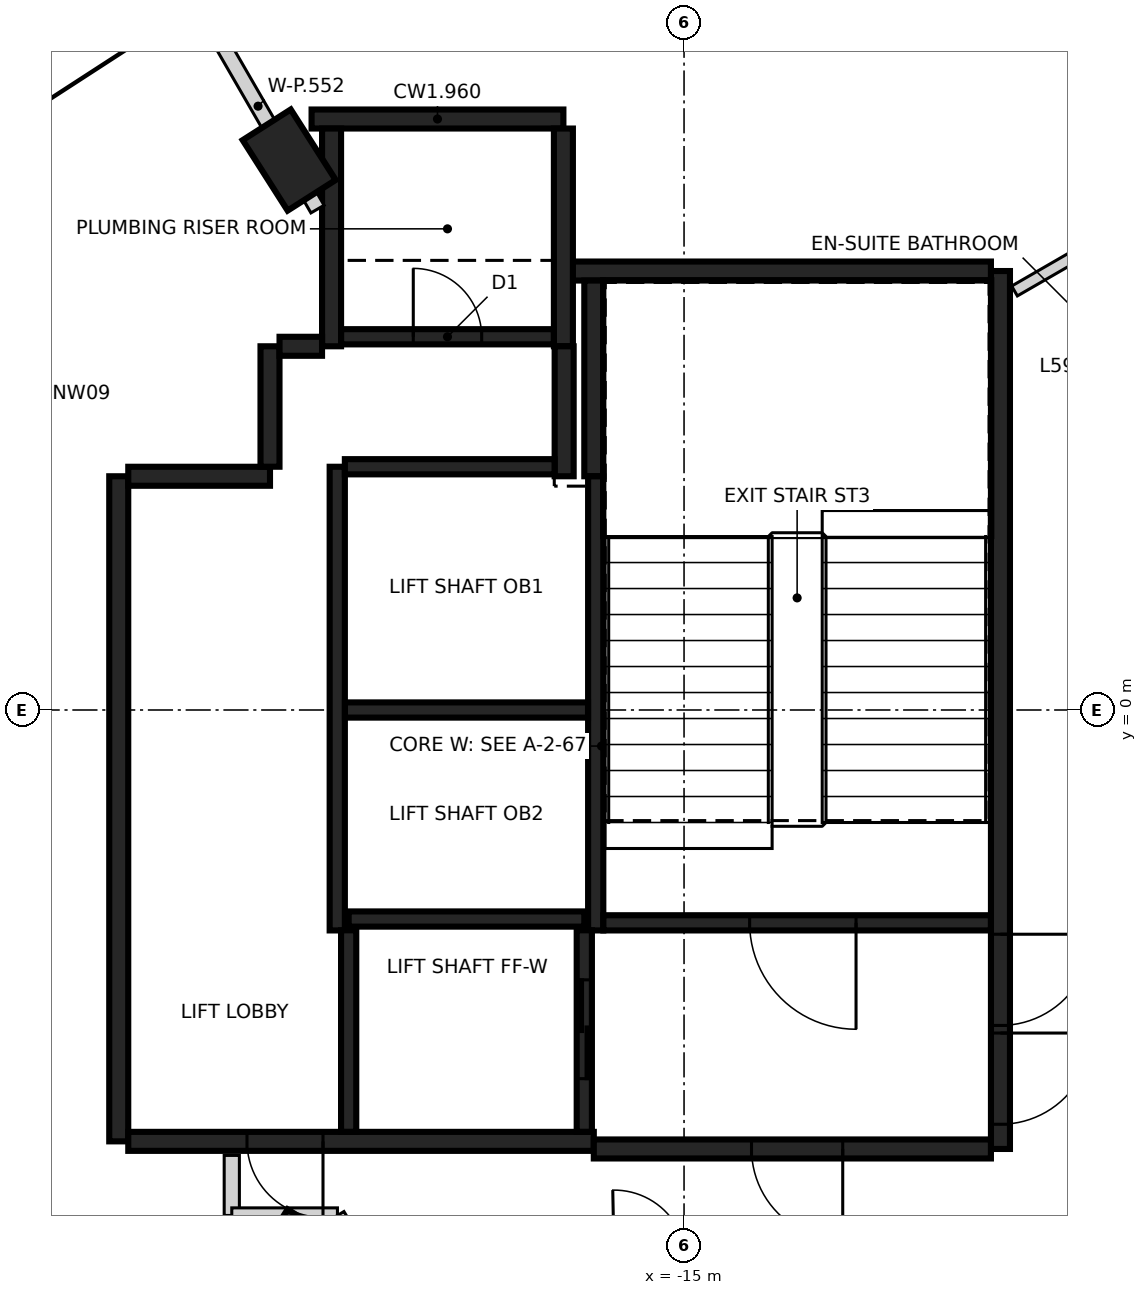
"""IFC4 building model, lengths in metres.
Left out: names, types, materials, properties, quantities, classifications, styles, units other than length and angle.
Written with IfcOpenShell. Run it as: python <this file> out.ifc"""

import sys

from ifc_helpers import new_model, si_unit, direction, frame, frame_2d, origin, origin_2d, place, context, subcontext, project, spatial, rectangle, extrude, element, fill, save


model = new_model("IFC4")
c1 = context("Model", 3, precision=1e-05, world=origin(), true_north=direction((0.0, 1.0)))
c2 = subcontext(c1, "Body", "Model", "MODEL_VIEW")
j1 = project(units=[si_unit("LENGTHUNIT", "METRE"), si_unit("PLANEANGLEUNIT", "RADIAN")], contexts=[c1])
p1 = place(None, origin())
s1 = spatial("IfcSite", under=j1, at=p1, CompositionType="ELEMENT")
p2 = place(p1, origin())
s2 = spatial("IfcBuilding", under=s1, at=p2, CompositionType="ELEMENT")
p3 = place(p2, frame((0.0, 0.0, 235.8)))
s3 = spatial("IfcBuildingStorey", under=s2, at=p3, CompositionType="ELEMENT", Elevation=235.8)
for number, where, z_axis, x_axis in (
    (1, (-20.195, 7.235, -0.35), (0.0, 0.0, 1.0), (-0.538, 0.843, 0.0)),
    (2, (-20.195, -7.235, -0.35), (0.0, 0.0, 1.0), (0.538, 0.843, 0.0)),
):
    element("IfcColumn", number, at=place(p3, frame(where, z_axis=z_axis, x_axis=x_axis)), inside=s3, PredefinedType="COLUMN", context=c2, shape_type="SweptSolid", body=[
        extrude(rectangle(XDim=1.1, YDim=0.75, at=origin_2d()), origin(), (0.0, 0.0, 1.0), 3.6),
    ])
p4 = place(p3, frame((-10.837, 5.775, 0.0), z_axis=(0.0, 0.0, 1.0), x_axis=(0.0, -1.0, 0.0)))
e3 = element("IfcWall", 3, at=p4, inside=s3, PredefinedType="SHEAR", context=c2, shape_type="SweptSolid", body=[
    extrude(rectangle(XDim=11.55, YDim=0.25, at=frame_2d((5.775, 0.0))), origin(), (0.0, 0.0, 1.0), 3.25),
])
p5 = place(p4, frame((10.025, 0.0, 0.0)))
e4 = element("IfcOpeningElement", 4, at=p5, cuts=e3, PredefinedType="OPENING", context=c2, shape_type="SweptSolid", body=[
    extrude(rectangle(XDim=1.2, YDim=2.1, at=frame_2d((0.6, 1.05))), frame((0.0, 0.135, 0.0), z_axis=(0.0, -1.0, 0.0), x_axis=(1.0, 0.0, 0.0)), (0.0, 0.0, 1.0), 0.27),
])
p6 = place(p4, frame((8.725, 0.0, 0.0)))
e5 = element("IfcOpeningElement", 5, at=p6, cuts=e3, PredefinedType="OPENING", context=c2, shape_type="SweptSolid", body=[
    extrude(rectangle(XDim=1.2, YDim=2.1, at=frame_2d((0.6, 1.05))), frame((0.0, 0.135, 0.0), z_axis=(0.0, -1.0, 0.0), x_axis=(1.0, 0.0, 0.0)), (0.0, 0.0, 1.0), 0.27),
])
p7 = place(p3, frame((-22.437, -5.675, 0.0), z_axis=(0.0, 0.0, 1.0), x_axis=(0.0, 1.0, 0.0)))
e6 = element("IfcWall", 6, at=p7, inside=s3, PredefinedType="SHEAR", context=c2, shape_type="SweptSolid", body=[
    extrude(rectangle(XDim=8.75, YDim=0.25, at=frame_2d((4.375, 0.0))), origin(), (0.0, 0.0, 1.0), 3.25),
])
p8 = place(p3, frame((-16.187, -5.675, 0.0), z_axis=(0.0, 0.0, 1.0), x_axis=(-1.0, 0.0, 0.0)))
e7 = element("IfcWall", 7, at=p8, inside=s3, PredefinedType="SHEAR", context=c2, shape_type="SweptSolid", body=[
    extrude(rectangle(XDim=6.125, YDim=0.25, at=frame_2d((3.062, 0.0))), origin(), (0.0, 0.0, 1.0), 3.25),
])
p9 = place(p8, frame((3.563, 0.0, 0.0)))
e8 = element("IfcOpeningElement", 8, at=p9, cuts=e7, PredefinedType="OPENING", context=c2, shape_type="SweptSolid", body=[
    extrude(rectangle(XDim=1.0, YDim=2.1, at=frame_2d((0.5, 1.05))), frame((0.0, 0.135, 0.0), z_axis=(0.0, -1.0, 0.0), x_axis=(1.0, 0.0, 0.0)), (0.0, 0.0, 1.0), 0.27),
])
p10 = place(p3, frame((-10.963, -5.775, 0.0), z_axis=(0.0, 0.0, 1.0), x_axis=(-1.0, 0.0, 0.0)))
e9 = element("IfcWall", 9, at=p10, inside=s3, PredefinedType="SHEAR", context=c2, shape_type="SweptSolid", body=[
    extrude(rectangle(XDim=5.225, YDim=0.25, at=frame_2d((2.612, 0.0))), origin(), (0.0, 0.0, 1.0), 3.25),
])
p11 = place(p10, frame((1.95, 0.0, 0.0)))
e10 = element("IfcOpeningElement", 10, at=p11, cuts=e9, PredefinedType="OPENING", context=c2, shape_type="SweptSolid", body=[
    extrude(rectangle(XDim=1.2, YDim=2.1, at=frame_2d((0.6, 1.05))), frame((0.0, 0.135, 0.0), z_axis=(0.0, -1.0, 0.0), x_axis=(1.0, 0.0, 0.0)), (0.0, 0.0, 1.0), 0.27),
])
p12 = place(p3, frame((-16.472, 5.775, 0.0), z_axis=(0.0, 0.0, 1.0), x_axis=(1.0, 0.0, 0.0)))
e11 = element("IfcWall", 11, at=p12, inside=s3, PredefinedType="SHEAR", context=c2, shape_type="SweptSolid", body=[
    extrude(rectangle(XDim=5.51, YDim=0.25, at=frame_2d((2.755, 0.0))), origin(), (0.0, 0.0, 1.0), 3.25),
])
p13 = place(p3, frame((-19.9, 7.775, 0.0), z_axis=(0.0, 0.0, 1.0), x_axis=(1.0, 0.0, 0.0)))
e12 = element("IfcWall", 12, at=p13, inside=s3, PredefinedType="SHEAR", context=c2, shape_type="SweptSolid", body=[
    extrude(rectangle(XDim=3.313, YDim=0.25, at=frame_2d((1.656, 0.0))), origin(), (0.0, 0.0, 1.0), 3.25),
])
for number, where, z_axis, x_axis in (
    (13, (-16.587, 7.65, 0.0), (0.0, 0.0, 1.0), (0.0, -1.0, 0.0)),
    (14, (-19.637, 4.785, 0.0), (0.0, 0.0, 1.0), (0.0, 1.0, 0.0)),
):
    element("IfcWall", number, at=place(p3, frame(where, z_axis=z_axis, x_axis=x_axis)), inside=s3, PredefinedType="SHEAR", context=c2, shape_type="SweptSolid", body=[
        extrude(rectangle(XDim=2.865, YDim=0.25, at=frame_2d((1.432, 0.0))), origin(), (0.0, 0.0, 1.0), 3.25),
    ])
p14 = place(p3, frame((-16.187, 3.075, 0.0), z_axis=(0.0, 0.0, 1.0), x_axis=(0.0, 1.0, 0.0)))
e15 = element("IfcWall", 15, at=p14, inside=s3, PredefinedType="SHEAR", context=c2, shape_type="SweptSolid", body=[
    extrude(rectangle(XDim=2.575, YDim=0.25, at=frame_2d((1.287, 0.0))), origin(), (0.0, 0.0, 1.0), 3.25),
])
p15 = place(p3, frame((-22.312, 3.075, 0.0), z_axis=(0.0, 0.0, 1.0), x_axis=(1.0, 0.0, 0.0)))
e16 = element("IfcWall", 16, at=p15, inside=s3, PredefinedType="SHEAR", context=c2, shape_type="SweptSolid", body=[
    extrude(rectangle(XDim=1.865, YDim=0.25, at=frame_2d((0.932, 0.0))), origin(), (0.0, 0.0, 1.0), 3.25),
])
p16 = place(p3, frame((-16.577, 4.785, 0.0), z_axis=(0.0, 0.0, 1.0), x_axis=(0.0, -1.0, 0.0)))
e17 = element("IfcWall", 17, at=p16, inside=s3, PredefinedType="SHEAR", context=c2, shape_type="SweptSolid", body=[
    extrude(rectangle(XDim=1.71, YDim=0.25, at=frame_2d((0.855, 0.0))), origin(), (0.0, 0.0, 1.0), 3.25),
])
p17 = place(p3, frame((-20.447, 3.2, 0.0), z_axis=(0.0, 0.0, 1.0), x_axis=(0.0, 1.0, 0.0)))
e18 = element("IfcWall", 18, at=p17, inside=s3, PredefinedType="SHEAR", context=c2, shape_type="SweptSolid", body=[
    extrude(rectangle(XDim=1.584, YDim=0.25, at=frame_2d((0.792, 0.0))), origin(), (0.0, 0.0, 1.0), 3.25),
])
p18 = place(p3, frame((-20.322, 4.785, 0.0), z_axis=(0.0, 0.0, 1.0), x_axis=(1.0, 0.0, 0.0)))
e19 = element("IfcWall", 19, at=p18, inside=s3, PredefinedType="SHEAR", context=c2, shape_type="SweptSolid", body=[
    extrude(rectangle(XDim=0.559, YDim=0.25, at=frame_2d((0.28, 0.0))), origin(), (0.0, 0.0, 1.0), 3.25),
])
p19 = place(p3, frame((-16.162, 3.074, 0.0), z_axis=(0.0, 0.0, 1.0), x_axis=(0.0, -1.0, 0.0)))
e20 = element("IfcWall", 20, at=p19, inside=s3, PredefinedType="SHEAR", context=c2, shape_type="SweptSolid", body=[
    extrude(rectangle(XDim=5.974, YDim=0.2, at=frame_2d((2.987, 0.0))), origin(), (0.0, 0.0, 1.0), 3.25),
])
p20 = place(p3, frame((-19.562, -2.9, 0.0), z_axis=(0.0, 0.0, 1.0), x_axis=(0.0, 1.0, 0.0)))
e21 = element("IfcWall", 21, at=p20, inside=s3, PredefinedType="SHEAR", context=c2, shape_type="SweptSolid", body=[
    extrude(rectangle(XDim=6.1, YDim=0.2, at=frame_2d((3.05, 0.0))), origin(), (0.0, 0.0, 1.0), 3.25),
])
p21 = place(p3, frame((-10.963, -2.8, 0.0), z_axis=(0.0, 0.0, 1.0), x_axis=(-1.0, 0.0, 0.0)))
e22 = element("IfcWall", 22, at=p21, inside=s3, PredefinedType="SHEAR", context=c2, shape_type="SweptSolid", body=[
    extrude(rectangle(XDim=5.098, YDim=0.2, at=frame_2d((2.549, 0.0))), origin(), (0.0, 0.0, 1.0), 3.25),
])
p22 = place(p21, frame((1.774, 0.0, 0.0)))
e23 = element("IfcOpeningElement", 23, at=p22, cuts=e22, PredefinedType="OPENING", context=c2, shape_type="SweptSolid", body=[
    extrude(rectangle(XDim=1.4, YDim=2.1, at=frame_2d((0.7, 1.05))), frame((0.0, 0.11, 0.0), z_axis=(0.0, -1.0, 0.0), x_axis=(1.0, 0.0, 0.0)), (0.0, 0.0, 1.0), 0.22),
])
p23 = place(p3, frame((-16.263, 0.0, 0.0), z_axis=(0.0, 0.0, 1.0), x_axis=(-1.0, 0.0, 0.0)))
e24 = element("IfcWall", 24, at=p23, inside=s3, PredefinedType="SHEAR", context=c2, shape_type="SweptSolid", body=[
    extrude(rectangle(XDim=3.198, YDim=0.2, at=frame_2d((1.599, 0.0))), origin(), (0.0, 0.0, 1.0), 3.25),
])
p24 = place(p3, frame((-19.511, 4.91, 0.0), z_axis=(0.0, 0.0, 1.0), x_axis=(1.0, 0.0, 0.0)))
e25 = element("IfcWall", 25, at=p24, inside=s3, PredefinedType="SHEAR", context=c2, shape_type="SweptSolid", body=[
    extrude(rectangle(XDim=2.798, YDim=0.2, at=frame_2d((1.399, 0.0))), origin(), (0.0, 0.0, 1.0), 3.25),
])
p25 = place(p24, frame((0.949, 0.0, 0.0)))
e26 = element("IfcOpeningElement", 26, at=p25, cuts=e25, PredefinedType="OPENING", context=c2, shape_type="SweptSolid", body=[
    extrude(rectangle(XDim=0.9, YDim=2.1, at=frame_2d((0.45, 1.05))), frame((0.0, 0.11, 0.0), z_axis=(0.0, -1.0, 0.0), x_axis=(1.0, 0.0, 0.0)), (0.0, 0.0, 1.0), 0.22),
])
p26 = place(p3, frame((-19.462, 3.2, 0.0), z_axis=(0.0, 0.0, 1.0), x_axis=(1.0, 0.0, 0.0)))
e27 = element("IfcWall", 27, at=p26, inside=s3, PredefinedType="SHEAR", context=c2, shape_type="SweptSolid", body=[
    extrude(rectangle(XDim=2.759, YDim=0.2, at=frame_2d((1.379, 0.0))), origin(), (0.0, 0.0, 1.0), 3.25),
])
p27 = place(p3, frame((-19.412, -2.75, 0.0), z_axis=(0.0, 0.0, 1.0), x_axis=(1.0, 0.0, 0.0)))
e28 = element("IfcWall", 28, at=p27, inside=s3, PredefinedType="SHEAR", context=c2, shape_type="SweptSolid", body=[
    extrude(rectangle(XDim=3.1, YDim=0.2, at=frame_2d((1.55, 0.0))), origin(), (0.0, 0.0, 1.0), 3.25),
])
p28 = place(p3, frame((-16.312, -2.898, 0.0), z_axis=(0.0, 0.0, 1.0), x_axis=(0.0, -1.0, 0.0)))
e29 = element("IfcWall", 29, at=p28, inside=s3, PredefinedType="SHEAR", context=c2, shape_type="SweptSolid", body=[
    extrude(rectangle(XDim=2.651, YDim=0.2, at=frame_2d((1.325, 0.0))), origin(), (0.0, 0.0, 1.0), 3.25),
])
p29 = place(p28, frame((0.652, 0.0, 0.0)))
e30 = element("IfcOpeningElement", 30, at=p29, cuts=e29, PredefinedType="OPENING", context=c2, shape_type="SweptSolid", body=[
    extrude(rectangle(XDim=1.3, YDim=2.1, at=frame_2d((0.65, 1.05))), frame((0.0, 0.11, 0.0), z_axis=(0.0, -1.0, 0.0), x_axis=(1.0, 0.0, 0.0)), (0.0, 0.0, 1.0), 0.22),
])
p30 = place(p3, frame((-19.412, -5.549, 0.0), z_axis=(0.0, 0.0, 1.0), x_axis=(0.0, 1.0, 0.0)))
e31 = element("IfcWall", 31, at=p30, inside=s3, PredefinedType="SHEAR", context=c2, shape_type="SweptSolid", body=[
    extrude(rectangle(XDim=2.651, YDim=0.2, at=frame_2d((1.325, 0.0))), origin(), (0.0, 0.0, 1.0), 3.25),
])
p31 = place(p3, frame((-20.95, -6.65, 0.0), z_axis=(0.0, 0.0, 1.0), x_axis=(0.0, 1.0, 0.0)))
e32 = element("IfcWall", 32, at=p31, inside=s3, PredefinedType="PARTITIONING", context=c2, shape_type="SweptSolid", body=[
    extrude(rectangle(XDim=0.79, YDim=0.2, at=frame_2d((0.395, 0.0))), origin(), (0.0, 0.0, 1.0), 2.35),
])
p32 = place(p3, frame((-20.95, -6.65, 0.0), z_axis=(0.0, 0.0, 1.0), x_axis=(1.0, 0.0, 0.0)))
e33 = element("IfcWall", 33, at=p32, inside=s3, PredefinedType="PARTITIONING", context=c2, shape_type="SweptSolid", body=[
    extrude(rectangle(XDim=1.39, YDim=0.2, at=frame_2d((0.695, 0.0))), origin(), (0.0, 0.0, 1.0), 2.35),
])
p33 = place(p3, frame((-19.56, -6.65, 0.0), z_axis=(0.0, 0.0, 1.0), x_axis=(0.517618709346, -0.855611402294, 0.0)))
e34 = element("IfcWall", 34, at=p33, inside=s3, PredefinedType="PARTITIONING", context=c2, shape_type="SweptSolid", body=[
    extrude(rectangle(XDim=0.792, YDim=0.2, at=frame_2d((0.396, 0.0))), origin(), (0.0, 0.0, 1.0), 3.25),
])
p34 = place(p3, frame((-9.931, -7.149, 0.0), z_axis=(0.0, 0.0, 1.0), x_axis=(0.499934418432, 0.86606326401, 0.0)))
e35 = element("IfcWall", 35, at=p34, inside=s3, PredefinedType="PARTITIONING", context=c2, shape_type="SweptSolid", body=[
    extrude(rectangle(XDim=3.556, YDim=0.2, at=frame_2d((1.778, 0.0))), origin(), (0.0, 0.0, 1.0), 3.25),
])
p35 = place(p3, frame((-21.386, 9.298, 0.0), z_axis=(0.0, 0.0, 1.0), x_axis=(0.500017489778, -0.866015305821, 0.0)))
e36 = element("IfcWall", 36, at=p35, inside=s3, PredefinedType="PARTITIONING", context=c2, shape_type="SweptSolid", body=[
    extrude(rectangle(XDim=3.128, YDim=0.2, at=frame_2d((1.564, 0.0))), origin(), (0.0, 0.0, 1.0), 3.25),
])
p36 = place(p3, frame((-12.407, -14.806, 0.0), z_axis=(0.0, 0.0, 1.0), x_axis=(0.500104175471, 0.865965249693, 0.0)))
e37 = element("IfcWall", 37, at=p36, inside=s3, PredefinedType="PARTITIONING", context=c2, shape_type="SweptSolid", body=[
    extrude(rectangle(XDim=11.423, YDim=0.2, at=frame_2d((5.711, 0.0))), origin(), (0.0, 0.0, 1.0), 2.35),
])
p37 = place(p3, frame((-10.652, 5.512, 0.0), z_axis=(0.0, 0.0, 1.0), x_axis=(0.866017156151, 0.500014285048, 0.0)))
e38 = element("IfcWall", 38, at=p37, inside=s3, PredefinedType="PARTITIONING", context=c2, shape_type="SweptSolid", body=[
    extrude(rectangle(XDim=1.931, YDim=0.15, at=frame_2d((0.966, 0.0))), origin(), (0.0, 0.0, 1.0), 3.25),
])
p38 = place(p29, origin())
e39 = element("IfcDoor", 39, at=p38, inside=s3, OperationType="SLIDING_TO_LEFT", PredefinedType="DOOR", context=c2, shape_type="SweptSolid", body=[
    extrude(rectangle(XDim=1.3, YDim=2.1, at=frame_2d((0.65, 1.05))), frame((0.0, 0.025, 0.0), z_axis=(0.0, -1.0, 0.0), x_axis=(1.0, 0.0, 0.0)), (0.0, 0.0, 1.0), 0.05),
])
fill(e30, e39)
p39 = place(p9, origin())
e40 = element("IfcDoor", 40, at=p39, inside=s3, OperationType="SINGLE_SWING_LEFT", PredefinedType="DOOR", context=c2, shape_type="SweptSolid", body=[
    extrude(rectangle(XDim=1.0, YDim=2.1, at=frame_2d((0.5, 1.05))), frame((0.0, 0.025, 0.0), z_axis=(0.0, -1.0, 0.0), x_axis=(1.0, 0.0, 0.0)), (0.0, 0.0, 1.0), 0.05),
])
fill(e8, e40)
p40 = place(p5, origin())
e41 = element("IfcDoor", 41, at=p40, inside=s3, OperationType="SINGLE_SWING_LEFT", PredefinedType="DOOR", context=c2, shape_type="SweptSolid", body=[
    extrude(rectangle(XDim=1.2, YDim=2.1, at=frame_2d((0.6, 1.05))), frame((0.0, 0.025, 0.0), z_axis=(0.0, -1.0, 0.0), x_axis=(1.0, 0.0, 0.0)), (0.0, 0.0, 1.0), 0.05),
])
fill(e4, e41)
p41 = place(p6, origin())
e42 = element("IfcDoor", 42, at=p41, inside=s3, OperationType="SINGLE_SWING_RIGHT", PredefinedType="DOOR", context=c2, shape_type="SweptSolid", body=[
    extrude(rectangle(XDim=1.2, YDim=2.1, at=frame_2d((0.6, 1.05))), frame((0.0, 0.025, 0.0), z_axis=(0.0, -1.0, 0.0), x_axis=(1.0, 0.0, 0.0)), (0.0, 0.0, 1.0), 0.05),
])
fill(e5, e42)
p42 = place(p22, origin())
e43 = element("IfcDoor", 43, at=p42, inside=s3, OperationType="SINGLE_SWING_LEFT", PredefinedType="DOOR", context=c2, shape_type="SweptSolid", body=[
    extrude(rectangle(XDim=1.4, YDim=2.1, at=frame_2d((0.7, 1.05))), frame((0.0, 0.025, 0.0), z_axis=(0.0, -1.0, 0.0), x_axis=(1.0, 0.0, 0.0)), (0.0, 0.0, 1.0), 0.05),
])
fill(e23, e43)
p43 = place(p25, origin())
e44 = element("IfcDoor", 44, at=p43, inside=s3, OperationType="SINGLE_SWING_RIGHT", PredefinedType="DOOR", context=c2, shape_type="SweptSolid", body=[
    extrude(rectangle(XDim=0.9, YDim=2.1, at=frame_2d((0.45, 1.05))), frame((0.0, 0.025, 0.0), z_axis=(0.0, -1.0, 0.0), x_axis=(1.0, 0.0, 0.0)), (0.0, 0.0, 1.0), 0.05),
])
fill(e26, e44)
p44 = place(p11, origin())
e45 = element("IfcDoor", 45, at=p44, inside=s3, OperationType="SINGLE_SWING_RIGHT", PredefinedType="DOOR", context=c2, shape_type="SweptSolid", body=[
    extrude(rectangle(XDim=1.2, YDim=2.1, at=frame_2d((0.6, 1.05))), frame((0.0, 0.025, 0.0), z_axis=(0.0, -1.0, 0.0), x_axis=(1.0, 0.0, 0.0)), (0.0, 0.0, 1.0), 0.05),
])
fill(e10, e45)
save(model, sys.argv[1])
